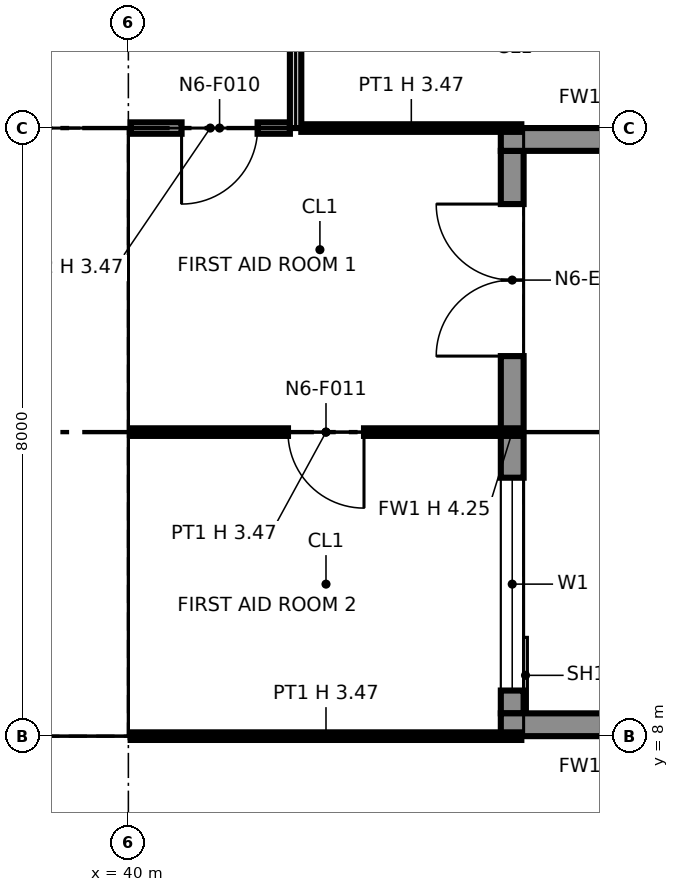
"""IFC4 building model, lengths in metres.
Left out: names, types, materials, properties, quantities, classifications, styles, units other than length and angle.
Written with IfcOpenShell. Run it as: python <this file> out.ifc"""

import sys

from ifc_helpers import new_model, si_unit, direction, frame, frame_2d, origin, origin_2d, place, context, subcontext, project, spatial, polyline, rectangle, i_section, outline, extrude, element, fill, save


model = new_model("IFC4")
c1 = context("Model", 3, precision=1e-05, world=origin(), true_north=direction((0.0, 1.0)))
c2 = subcontext(c1, "Body", "Model", "MODEL_VIEW")
j1 = project(units=[si_unit("LENGTHUNIT", "METRE"), si_unit("PLANEANGLEUNIT", "RADIAN")], contexts=[c1])
p1 = place(None, origin())
s1 = spatial("IfcSite", under=j1, at=p1, CompositionType="ELEMENT")
p2 = place(p1, origin())
s2 = spatial("IfcBuilding", under=s1, at=p2, CompositionType="ELEMENT")
p3 = place(p2, frame((0.0, 0.0, 96.4)))
s3 = spatial("IfcBuildingStorey", under=s2, at=p3, CompositionType="ELEMENT", Elevation=96.4)
for number, where, z_axis, x_axis in (
    (1, (40.0, 8.0, 0.0), (0.0, 0.0, 1.0), (1.0, 0.0, 0.0)),
    (2, (40.0, 16.0, 0.0), (0.0, 0.0, 1.0), (1.0, 0.0, 0.0)),
):
    element("IfcColumn", number, at=place(p3, frame(where, z_axis=z_axis, x_axis=x_axis)), inside=s3, PredefinedType="COLUMN", context=c2, shape_type="SweptSolid", body=[
        extrude(i_section(OverallWidth=0.406, OverallDepth=0.417, WebThickness=0.03, FlangeThickness=0.048, at=origin_2d()), origin(), (0.0, 0.0, 1.0), 4.25),
    ])
p4 = place(p3, frame((45.05, 8.3, 0.0), z_axis=(0.0, 0.0, 1.0), x_axis=(0.0, 1.0, 0.0)))
e3 = element("IfcWall", 3, at=p4, inside=s3, PredefinedType="SOLIDWALL", context=c2, shape_type="SweptSolid", body=[
    extrude(rectangle(XDim=7.4, YDim=0.3, at=frame_2d((3.7, 0.0))), origin(), (0.0, 0.0, 1.0), 4.25),
])
p5 = place(p4, frame((0.3, 0.0, 0.9)))
e4 = element("IfcOpeningElement", 4, at=p5, cuts=e3, PredefinedType="OPENING", context=c2, shape_type="SweptSolid", body=[
    extrude(rectangle(XDim=2.8, YDim=2.2, at=frame_2d((1.4, 1.1))), frame((0.0, 0.16, 0.0), z_axis=(0.0, -1.0, 0.0), x_axis=(1.0, 0.0, 0.0)), (0.0, 0.0, 1.0), 0.32),
])
p6 = place(p4, frame((4.7, 0.0, 0.0)))
e5 = element("IfcOpeningElement", 5, at=p6, cuts=e3, PredefinedType="OPENING", context=c2, shape_type="SweptSolid", body=[
    extrude(rectangle(XDim=2.0, YDim=2.4, at=frame_2d((1.0, 1.2))), frame((0.0, 0.16, 0.0), z_axis=(0.0, -1.0, 0.0), x_axis=(1.0, 0.0, 0.0)), (0.0, 0.0, 1.0), 0.32),
])
p7 = place(p3, frame((47.9, 8.15, 0.0), z_axis=(0.0, 0.0, 1.0), x_axis=(-1.0, 0.0, 0.0)))
e6 = element("IfcWall", 6, at=p7, inside=s3, PredefinedType="SOLIDWALL", context=c2, shape_type="SweptSolid", body=[
    extrude(rectangle(XDim=3.0, YDim=0.3, at=frame_2d((1.5, 0.0))), origin(), (0.0, 0.0, 1.0), 3.469),
])
p8 = place(p3, frame((47.9, 15.85, 0.0), z_axis=(0.0, 0.0, 1.0), x_axis=(-1.0, 0.0, 0.0)))
e7 = element("IfcWall", 7, at=p8, inside=s3, PredefinedType="SOLIDWALL", context=c2, shape_type="SweptSolid", body=[
    extrude(rectangle(XDim=3.0, YDim=0.3, at=frame_2d((1.5, 0.0))), origin(), (0.0, 0.0, 1.0), 3.556),
])
p9 = place(p3, frame((24.65, 8.75, 0.0), z_axis=(0.0, 0.0, 1.0), x_axis=(1.0, 0.0, 0.0)))
e8 = element("IfcWall", 8, at=p9, inside=s3, PredefinedType="PARTITIONING", context=c2, shape_type="SweptSolid", body=[
    extrude(outline(polyline([(0.0, 0.0), (14.7, 0.0), (14.7, 4.25), (7.469, 4.25), (7.469, 3.632), (7.231, 3.632), (7.23, 4.25), (0.0, 4.25), (0.0, 0.0)])), frame((0.0, 0.1, 0.0), z_axis=(0.0, -1.0, 0.0), x_axis=(1.0, 0.0, 0.0)), (0.0, 0.0, 1.0), 0.2),
])
p10 = place(p3, frame((24.65, 15.25, 0.0), z_axis=(0.0, 0.0, 1.0), x_axis=(1.0, 0.0, 0.0)))
e9 = element("IfcWall", 9, at=p10, inside=s3, PredefinedType="PARTITIONING", context=c2, shape_type="SweptSolid", body=[
    extrude(outline(polyline([(0.0, 0.0), (14.7, 0.0), (14.7, 4.25), (7.469, 4.25), (7.469, 3.632), (7.231, 3.632), (7.23, 4.25), (0.0, 4.25), (0.0, 0.0)])), frame((0.0, 0.1, 0.0), z_axis=(0.0, -1.0, 0.0), x_axis=(1.0, 0.0, 0.0)), (0.0, 0.0, 1.0), 0.2),
])
p11 = place(p10, frame((2.85, 0.0, 0.0)))
e10 = element("IfcOpeningElement", 10, at=p11, cuts=e9, PredefinedType="OPENING", context=c2, shape_type="SweptSolid", body=[
    extrude(rectangle(XDim=1.8, YDim=2.1, at=frame_2d((0.9, 1.05))), frame((0.0, 0.11, 0.0), z_axis=(0.0, -1.0, 0.0), x_axis=(1.0, 0.0, 0.0)), (0.0, 0.0, 1.0), 0.22),
])
p12 = place(p10, frame((9.95, 0.0, 0.0), z_axis=(0.0, 0.0, 1.0), x_axis=(-1.0, 0.0, 0.0)))
e11 = element("IfcOpeningElement", 11, at=p12, cuts=e9, PredefinedType="OPENING", context=c2, shape_type="SweptSolid", body=[
    extrude(rectangle(XDim=1.4, YDim=2.1, at=frame_2d((0.7, 1.05))), frame((0.0, 0.11, 0.0), z_axis=(0.0, -1.0, 0.0), x_axis=(1.0, 0.0, 0.0)), (0.0, 0.0, 1.0), 0.22),
])
p13 = place(p10, frame((13.4, 0.0, 0.0), z_axis=(0.0, 0.0, 1.0), x_axis=(-1.0, 0.0, 0.0)))
e12 = element("IfcOpeningElement", 12, at=p13, cuts=e9, PredefinedType="OPENING", context=c2, shape_type="SweptSolid", body=[
    extrude(rectangle(XDim=1.4, YDim=2.1, at=frame_2d((0.7, 1.05))), frame((0.0, 0.11, 0.0), z_axis=(0.0, -1.0, 0.0), x_axis=(1.0, 0.0, 0.0)), (0.0, 0.0, 1.0), 0.22),
])
p14 = place(p3, frame((39.25, 8.85, 0.0), z_axis=(0.0, 0.0, 1.0), x_axis=(0.0, 1.0, 0.0)))
e13 = element("IfcWall", 13, at=p14, inside=s3, PredefinedType="PARTITIONING", context=c2, shape_type="SweptSolid", body=[
    extrude(rectangle(XDim=6.3, YDim=0.2, at=frame_2d((3.15, 0.0))), origin(), (0.0, 0.0, 1.0), 4.25),
])
p15 = place(p3, frame((40.03, 8.0, 0.0), z_axis=(0.0, 0.0, 1.0), x_axis=(1.0, 0.0, 0.0)))
e14 = element("IfcWall", 14, at=p15, inside=s3, PredefinedType="PARTITIONING", context=c2, shape_type="SweptSolid", body=[
    extrude(rectangle(XDim=5.14, YDim=0.1, at=frame_2d((2.57, 0.0))), origin(), (0.0, 0.0, 1.0), 3.47),
])
p16 = place(p3, frame((40.03, 12.0, 0.0), z_axis=(0.0, 0.0, 1.0), x_axis=(1.0, 0.0, 0.0)))
e15 = element("IfcWall", 15, at=p16, inside=s3, PredefinedType="PARTITIONING", context=c2, shape_type="SweptSolid", body=[
    extrude(rectangle(XDim=5.14, YDim=0.1, at=frame_2d((2.57, 0.0))), origin(), (0.0, 0.0, 1.0), 3.47),
])
p17 = place(p16, frame((3.07, 0.0, 0.0), z_axis=(0.0, 0.0, 1.0), x_axis=(-1.0, 0.0, 0.0)))
e16 = element("IfcOpeningElement", 16, at=p17, cuts=e15, PredefinedType="OPENING", context=c2, shape_type="SweptSolid", body=[
    extrude(rectangle(XDim=1.0, YDim=2.1, at=frame_2d((0.5, 1.05))), frame((0.0, 0.06, 0.0), z_axis=(0.0, -1.0, 0.0), x_axis=(1.0, 0.0, 0.0)), (0.0, 0.0, 1.0), 0.12),
])
p18 = place(p3, frame((40.03, 16.0, 0.0), z_axis=(0.0, 0.0, 1.0), x_axis=(1.0, 0.0, 0.0)))
e17 = element("IfcWall", 17, at=p18, inside=s3, PredefinedType="PARTITIONING", context=c2, shape_type="SweptSolid", body=[
    extrude(rectangle(XDim=2.095, YDim=0.15, at=frame_2d((1.047, 0.0))), origin(), (0.0, 0.0, 1.0), 3.47),
])
p19 = place(p18, frame((1.67, 0.0, 0.0), z_axis=(0.0, 0.0, 1.0), x_axis=(-1.0, 0.0, 0.0)))
e18 = element("IfcOpeningElement", 18, at=p19, cuts=e17, PredefinedType="OPENING", context=c2, shape_type="SweptSolid", body=[
    extrude(rectangle(XDim=1.0, YDim=2.1, at=frame_2d((0.5, 1.05))), frame((0.0, 0.085, 0.0), z_axis=(0.0, -1.0, 0.0), x_axis=(1.0, 0.0, 0.0)), (0.0, 0.0, 1.0), 0.17),
])
p20 = place(p3, frame((42.275, 16.0, 0.0), z_axis=(0.0, 0.0, 1.0), x_axis=(1.0, 0.0, 0.0)))
e19 = element("IfcWall", 19, at=p20, inside=s3, PredefinedType="PARTITIONING", context=c2, shape_type="SweptSolid", body=[
    extrude(rectangle(XDim=2.895, YDim=0.1, at=frame_2d((1.448, 0.0))), origin(), (0.0, 0.0, 1.0), 3.47),
])
p21 = place(p3, frame((42.2, 16.0, 0.0), z_axis=(0.0, 0.0, 1.0), x_axis=(0.0, 1.0, 0.0)))
e20 = element("IfcWall", 20, at=p21, inside=s3, PredefinedType="PARTITIONING", context=c2, shape_type="SweptSolid", body=[
    extrude(outline(polyline([(0.0, 0.0), (26.125, 0.0), (26.125, 4.25), (24.3, 4.25), (24.298, 3.47), (23.702, 3.47), (23.7, 4.25), (20.3, 4.25), (20.298, 3.47), (19.702, 3.47), (19.7, 4.25), (16.3, 4.25), (16.298, 3.47), (15.702, 3.47), (15.7, 4.25), (12.3, 4.25), (12.298, 3.47), (11.702, 3.47), (11.7, 4.25), (8.3, 4.25), (8.298, 3.47), (7.702, 3.47), (7.7, 4.25), (4.3, 4.25), (4.298, 3.47), (3.702, 3.47), (3.7, 4.25), (0.0, 4.25), (0.0, 0.0)])), frame((0.0, 0.075, 0.0), z_axis=(0.0, -1.0, 0.0), x_axis=(1.0, 0.0, 0.0)), (0.0, 0.0, 1.0), 0.15),
])
p22 = place(p21, frame((2.5, 0.0, 0.0), z_axis=(0.0, 0.0, 1.0), x_axis=(-1.0, 0.0, 0.0)))
e21 = element("IfcOpeningElement", 21, at=p22, cuts=e20, PredefinedType="OPENING", context=c2, shape_type="SweptSolid", body=[
    extrude(rectangle(XDim=1.0, YDim=2.1, at=frame_2d((0.5, 1.05))), frame((0.0, 0.085, 0.0), z_axis=(0.0, -1.0, 0.0), x_axis=(1.0, 0.0, 0.0)), (0.0, 0.0, 1.0), 0.17),
])
p23 = place(p21, frame((6.5, 0.0, 0.0), z_axis=(0.0, 0.0, 1.0), x_axis=(-1.0, 0.0, 0.0)))
e22 = element("IfcOpeningElement", 22, at=p23, cuts=e20, PredefinedType="OPENING", context=c2, shape_type="SweptSolid", body=[
    extrude(rectangle(XDim=1.0, YDim=2.1, at=frame_2d((0.5, 1.05))), frame((0.0, 0.085, 0.0), z_axis=(0.0, -1.0, 0.0), x_axis=(1.0, 0.0, 0.0)), (0.0, 0.0, 1.0), 0.17),
])
p24 = place(p21, frame((12.5, 0.0, 0.0), z_axis=(0.0, 0.0, 1.0), x_axis=(-1.0, 0.0, 0.0)))
e23 = element("IfcOpeningElement", 23, at=p24, cuts=e20, PredefinedType="OPENING", context=c2, shape_type="SweptSolid", body=[
    extrude(rectangle(XDim=1.0, YDim=2.1, at=frame_2d((0.5, 1.05))), frame((0.0, 0.085, 0.0), z_axis=(0.0, -1.0, 0.0), x_axis=(1.0, 0.0, 0.0)), (0.0, 0.0, 1.0), 0.17),
])
p25 = place(p21, frame((18.5, 0.0, 0.0), z_axis=(0.0, 0.0, 1.0), x_axis=(-1.0, 0.0, 0.0)))
e24 = element("IfcOpeningElement", 24, at=p25, cuts=e20, PredefinedType="OPENING", context=c2, shape_type="SweptSolid", body=[
    extrude(rectangle(XDim=1.0, YDim=2.1, at=frame_2d((0.5, 1.05))), frame((0.0, 0.085, 0.0), z_axis=(0.0, -1.0, 0.0), x_axis=(1.0, 0.0, 0.0)), (0.0, 0.0, 1.0), 0.17),
])
p26 = place(p21, frame((22.5, 0.0, 0.0), z_axis=(0.0, 0.0, 1.0), x_axis=(-1.0, 0.0, 0.0)))
e25 = element("IfcOpeningElement", 25, at=p26, cuts=e20, PredefinedType="OPENING", context=c2, shape_type="SweptSolid", body=[
    extrude(rectangle(XDim=1.0, YDim=2.1, at=frame_2d((0.5, 1.05))), frame((0.0, 0.085, 0.0), z_axis=(0.0, -1.0, 0.0), x_axis=(1.0, 0.0, 0.0)), (0.0, 0.0, 1.0), 0.17),
])
p27 = place(p21, frame((25.6, 0.0, 0.0), z_axis=(0.0, 0.0, 1.0), x_axis=(-1.0, 0.0, 0.0)))
e26 = element("IfcOpeningElement", 26, at=p27, cuts=e20, PredefinedType="OPENING", context=c2, shape_type="SweptSolid", body=[
    extrude(rectangle(XDim=1.0, YDim=2.1, at=frame_2d((0.5, 1.05))), frame((0.0, 0.085, 0.0), z_axis=(0.0, -1.0, 0.0), x_axis=(1.0, 0.0, 0.0)), (0.0, 0.0, 1.0), 0.17),
])
p28 = place(p5, origin())
e27 = element("IfcWindow", 27, at=p28, inside=s3, PartitioningType="SINGLE_PANEL", PredefinedType="WINDOW", context=c2, shape_type="SweptSolid", body=[
    extrude(rectangle(XDim=2.8, YDim=2.2, at=frame_2d((1.4, 1.1))), frame((0.0, 0.03, 0.0), z_axis=(0.0, -1.0, 0.0), x_axis=(1.0, 0.0, 0.0)), (0.0, 0.0, 1.0), 0.06),
])
fill(e4, e27)
p29 = place(p6, origin())
e28 = element("IfcDoor", 28, at=p29, inside=s3, OperationType="DOUBLE_DOOR_SINGLE_SWING", PredefinedType="DOOR", context=c2, shape_type="SweptSolid", body=[
    extrude(rectangle(XDim=2.0, YDim=2.4, at=frame_2d((1.0, 1.2))), frame((0.0, 0.025, 0.0), z_axis=(0.0, -1.0, 0.0), x_axis=(1.0, 0.0, 0.0)), (0.0, 0.0, 1.0), 0.05),
])
fill(e5, e28)
p30 = place(p19, origin())
e29 = element("IfcDoor", 29, at=p30, inside=s3, OperationType="SINGLE_SWING_RIGHT", PredefinedType="DOOR", context=c2, shape_type="SweptSolid", body=[
    extrude(rectangle(XDim=1.0, YDim=2.1, at=frame_2d((0.5, 1.05))), frame((0.0, 0.025, 0.0), z_axis=(0.0, -1.0, 0.0), x_axis=(1.0, 0.0, 0.0)), (0.0, 0.0, 1.0), 0.05),
])
fill(e18, e29)
p31 = place(p17, origin())
e30 = element("IfcDoor", 30, at=p31, inside=s3, OperationType="SINGLE_SWING_LEFT", PredefinedType="DOOR", context=c2, shape_type="SweptSolid", body=[
    extrude(rectangle(XDim=1.0, YDim=2.1, at=frame_2d((0.5, 1.05))), frame((0.0, 0.025, 0.0), z_axis=(0.0, -1.0, 0.0), x_axis=(1.0, 0.0, 0.0)), (0.0, 0.0, 1.0), 0.05),
])
fill(e16, e30)
save(model, sys.argv[1])
